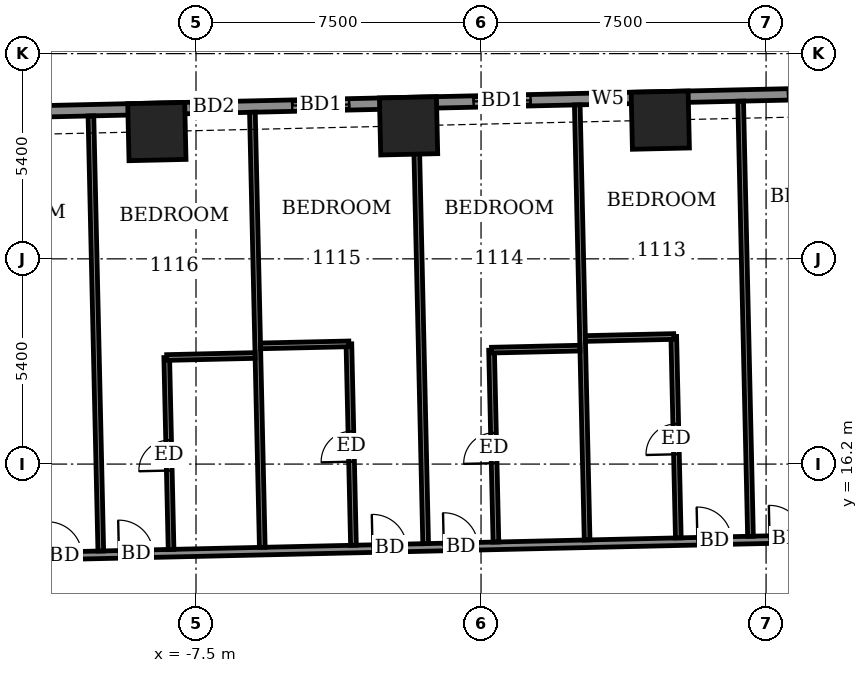
"""IFC4 building model, lengths in metres.
Left out: names, types, materials, properties, quantities, classifications, styles, units other than length and angle.
Written with IfcOpenShell. Run it as: python <this file> out.ifc"""

import sys

from ifc_helpers import new_model, si_unit, direction, frame, frame_2d, origin, origin_2d, place, context, subcontext, project, spatial, rectangle, extrude, element, fill, save


model = new_model("IFC4")
c1 = context("Model", 3, precision=1e-05, world=origin(), true_north=direction((0.0, 1.0)))
c2 = subcontext(c1, "Body", "Model", "MODEL_VIEW")
j1 = project(units=[si_unit("LENGTHUNIT", "METRE"), si_unit("PLANEANGLEUNIT", "RADIAN")], contexts=[c1])
p1 = place(None, origin())
s1 = spatial("IfcSite", under=j1, at=p1, CompositionType="ELEMENT")
p2 = place(p1, origin())
s2 = spatial("IfcBuilding", under=s1, at=p2, CompositionType="ELEMENT")
p3 = place(p2, frame((0.0, 0.0, 48.5)))
s3 = spatial("IfcBuildingStorey", under=s2, at=p3, CompositionType="ELEMENT", Elevation=48.5)
for number, where, z_axis, x_axis in (
    (1, (4.716, 25.25, -0.55), (0.0, 0.0, 1.0), (-1.0, -0.023, 0.0)),
    (2, (-1.907, 25.1, -0.55), (0.0, 0.0, 1.0), (-1.0, -0.023, 0.0)),
    (3, (-8.53, 24.949, -0.55), (0.0, 0.0, 1.0), (-1.0, -0.023, 0.0)),
):
    element("IfcColumn", number, at=place(p3, frame(where, z_axis=z_axis, x_axis=x_axis)), inside=s3, PredefinedType="COLUMN", context=c2, shape_type="SweptSolid", body=[
        extrude(rectangle(XDim=1.5, YDim=1.5, at=origin_2d()), origin(), (0.0, 0.0, 1.0), 3.6),
    ])
p4 = place(p3, frame((24.423, 26.298, 0.0), z_axis=(0.0, 0.0, 1.0), x_axis=(-0.999742433108, -0.022695097355, 0.0)))
e4 = element("IfcWall", 4, at=p4, inside=s3, PredefinedType="SOLIDWALL", context=c2, shape_type="SweptSolid", body=[
    extrude(rectangle(XDim=52.701, YDim=0.3, at=frame_2d((26.35, 0.0))), origin(), (0.0, 0.0, 1.0), 3.05),
])
p5 = place(p4, frame((2.009, 0.0, 0.0)))
e5 = element("IfcOpeningElement", 5, at=p5, cuts=e4, PredefinedType="OPENING", context=c2, shape_type="SweptSolid", body=[
    extrude(rectangle(XDim=1.5, YDim=2.4, at=frame_2d((0.75, 1.2))), frame((0.0, 0.16, 0.0), z_axis=(0.0, -1.0, 0.0), x_axis=(1.0, 0.0, 0.0)), (0.0, 0.0, 1.0), 0.32),
])
p6 = place(p4, frame((7.337, 0.0, 0.0)))
e6 = element("IfcOpeningElement", 6, at=p6, cuts=e4, PredefinedType="OPENING", context=c2, shape_type="SweptSolid", body=[
    extrude(rectangle(XDim=1.2, YDim=2.4, at=frame_2d((0.6, 1.2))), frame((0.0, 0.16, 0.0), z_axis=(0.0, -1.0, 0.0), x_axis=(1.0, 0.0, 0.0)), (0.0, 0.0, 1.0), 0.32),
])
p7 = place(p4, frame((10.0, 0.0, 0.0)))
e7 = element("IfcOpeningElement", 7, at=p7, cuts=e4, PredefinedType="OPENING", context=c2, shape_type="SweptSolid", body=[
    extrude(rectangle(XDim=1.5, YDim=2.4, at=frame_2d((0.75, 1.2))), frame((0.0, 0.16, 0.0), z_axis=(0.0, -1.0, 0.0), x_axis=(1.0, 0.0, 0.0)), (0.0, 0.0, 1.0), 0.32),
])
p8 = place(p4, frame((14.85, 0.0, 0.0)))
e8 = element("IfcOpeningElement", 8, at=p8, cuts=e4, PredefinedType="OPENING", context=c2, shape_type="SweptSolid", body=[
    extrude(rectangle(XDim=1.5, YDim=2.4, at=frame_2d((0.75, 1.2))), frame((0.0, 0.16, 0.0), z_axis=(0.0, -1.0, 0.0), x_axis=(1.0, 0.0, 0.0)), (0.0, 0.0, 1.0), 0.32),
])
p9 = place(p4, frame((20.638, 0.0, 0.9)))
e9 = element("IfcOpeningElement", 9, at=p9, cuts=e4, PredefinedType="OPENING", context=c2, shape_type="SweptSolid", body=[
    extrude(rectangle(XDim=0.9, YDim=1.5, at=frame_2d((0.45, 0.75))), frame((0.0, 0.16, 0.0), z_axis=(0.0, -1.0, 0.0), x_axis=(1.0, 0.0, 0.0)), (0.0, 0.0, 1.0), 0.32),
])
p10 = place(p4, frame((23.125, 0.0, 0.0)))
e10 = element("IfcOpeningElement", 10, at=p10, cuts=e4, PredefinedType="OPENING", context=c2, shape_type="SweptSolid", body=[
    extrude(rectangle(XDim=1.5, YDim=2.4, at=frame_2d((0.75, 1.2))), frame((0.0, 0.16, 0.0), z_axis=(0.0, -1.0, 0.0), x_axis=(1.0, 0.0, 0.0)), (0.0, 0.0, 1.0), 0.32),
])
p11 = place(p4, frame((27.9, 0.0, 0.0)))
e11 = element("IfcOpeningElement", 11, at=p11, cuts=e4, PredefinedType="OPENING", context=c2, shape_type="SweptSolid", body=[
    extrude(rectangle(XDim=1.5, YDim=2.4, at=frame_2d((0.75, 1.2))), frame((0.0, 0.16, 0.0), z_axis=(0.0, -1.0, 0.0), x_axis=(1.0, 0.0, 0.0)), (0.0, 0.0, 1.0), 0.32),
])
p12 = place(p4, frame((30.862, 0.0, 0.0)))
e12 = element("IfcOpeningElement", 12, at=p12, cuts=e4, PredefinedType="OPENING", context=c2, shape_type="SweptSolid", body=[
    extrude(rectangle(XDim=1.2, YDim=2.4, at=frame_2d((0.6, 1.2))), frame((0.0, 0.16, 0.0), z_axis=(0.0, -1.0, 0.0), x_axis=(1.0, 0.0, 0.0)), (0.0, 0.0, 1.0), 0.32),
])
p13 = place(p4, frame((36.1, 0.0, 0.0)))
e13 = element("IfcOpeningElement", 13, at=p13, cuts=e4, PredefinedType="OPENING", context=c2, shape_type="SweptSolid", body=[
    extrude(rectangle(XDim=1.5, YDim=2.4, at=frame_2d((0.75, 1.2))), frame((0.0, 0.16, 0.0), z_axis=(0.0, -1.0, 0.0), x_axis=(1.0, 0.0, 0.0)), (0.0, 0.0, 1.0), 0.32),
])
p14 = place(p4, frame((40.975, 0.0, 0.0)))
e14 = element("IfcOpeningElement", 14, at=p14, cuts=e4, PredefinedType="OPENING", context=c2, shape_type="SweptSolid", body=[
    extrude(rectangle(XDim=1.5, YDim=2.4, at=frame_2d((0.75, 1.2))), frame((0.0, 0.16, 0.0), z_axis=(0.0, -1.0, 0.0), x_axis=(1.0, 0.0, 0.0)), (0.0, 0.0, 1.0), 0.32),
])
p15 = place(p4, frame((43.788, 0.0, 0.0)))
e15 = element("IfcOpeningElement", 15, at=p15, cuts=e4, PredefinedType="OPENING", context=c2, shape_type="SweptSolid", body=[
    extrude(rectangle(XDim=1.5, YDim=2.4, at=frame_2d((0.75, 1.2))), frame((0.0, 0.16, 0.0), z_axis=(0.0, -1.0, 0.0), x_axis=(1.0, 0.0, 0.0)), (0.0, 0.0, 1.0), 0.32),
])
p16 = place(p4, frame((48.464, 0.0, 0.9)))
e16 = element("IfcOpeningElement", 16, at=p16, cuts=e4, PredefinedType="OPENING", context=c2, shape_type="SweptSolid", body=[
    extrude(rectangle(XDim=2.4, YDim=1.5, at=frame_2d((1.2, 0.75))), frame((0.0, 0.16, 0.0), z_axis=(0.0, -1.0, 0.0), x_axis=(1.0, 0.0, 0.0)), (0.0, 0.0, 1.0), 0.32),
])
p17 = place(p3, frame((-12.25, 26.915, 0.0), z_axis=(0.0, 0.0, 1.0), x_axis=(0.999743094499, 0.022665943652, 0.0)))
e17 = element("IfcWall", 17, at=p17, inside=s3, PredefinedType="USERDEFINED", context=c2, shape_type="SweptSolid", body=[
    extrude(rectangle(XDim=6.0, YDim=0.55, at=frame_2d((3.0, 0.0))), origin(), (0.0, 0.0, 1.0), 0.8),
])
p18 = place(p3, frame((-31.347, 13.329, 0.0), z_axis=(0.0, 0.0, 1.0), x_axis=(0.999742613079, 0.022687168058, 0.0)))
e18 = element("IfcWall", 18, at=p18, inside=s3, PredefinedType="PARTITIONING", context=c2, shape_type="SweptSolid", body=[
    extrude(rectangle(XDim=58.799, YDim=0.2, at=frame_2d((29.399, 0.0))), origin(), (0.0, 0.0, 1.0), 3.05),
])
p19 = place(p18, frame((56.675, 0.0, 0.0)))
e19 = element("IfcOpeningElement", 19, at=p19, cuts=e18, PredefinedType="OPENING", context=c2, shape_type="SweptSolid", body=[
    extrude(rectangle(XDim=1.0, YDim=2.1, at=frame_2d((0.5, 1.05))), frame((0.0, 0.11, 0.0), z_axis=(0.0, -1.0, 0.0), x_axis=(1.0, 0.0, 0.0)), (0.0, 0.0, 1.0), 0.22),
])
p20 = place(p18, frame((52.4, 0.0, 0.0)))
e20 = element("IfcOpeningElement", 20, at=p20, cuts=e18, PredefinedType="OPENING", context=c2, shape_type="SweptSolid", body=[
    extrude(rectangle(XDim=0.9, YDim=2.1, at=frame_2d((0.45, 1.05))), frame((0.0, 0.11, 0.0), z_axis=(0.0, -1.0, 0.0), x_axis=(1.0, 0.0, 0.0)), (0.0, 0.0, 1.0), 0.22),
])
p21 = place(p18, frame((47.7, 0.0, 0.0)))
e21 = element("IfcOpeningElement", 21, at=p21, cuts=e18, PredefinedType="OPENING", context=c2, shape_type="SweptSolid", body=[
    extrude(rectangle(XDim=0.9, YDim=2.1, at=frame_2d((0.45, 1.05))), frame((0.0, 0.11, 0.0), z_axis=(0.0, -1.0, 0.0), x_axis=(1.0, 0.0, 0.0)), (0.0, 0.0, 1.0), 0.22),
])
p22 = place(p18, frame((45.7, 0.0, 0.0)))
e22 = element("IfcOpeningElement", 22, at=p22, cuts=e18, PredefinedType="OPENING", context=c2, shape_type="SweptSolid", body=[
    extrude(rectangle(XDim=0.9, YDim=2.1, at=frame_2d((0.45, 1.05))), frame((0.0, 0.11, 0.0), z_axis=(0.0, -1.0, 0.0), x_axis=(1.0, 0.0, 0.0)), (0.0, 0.0, 1.0), 0.22),
])
p23 = place(p18, frame((38.95, 0.0, 0.0)))
e23 = element("IfcOpeningElement", 23, at=p23, cuts=e18, PredefinedType="OPENING", context=c2, shape_type="SweptSolid", body=[
    extrude(rectangle(XDim=0.9, YDim=2.1, at=frame_2d((0.45, 1.05))), frame((0.0, 0.11, 0.0), z_axis=(0.0, -1.0, 0.0), x_axis=(1.0, 0.0, 0.0)), (0.0, 0.0, 1.0), 0.22),
])
p24 = place(p18, frame((37.05, 0.0, 0.0)))
e24 = element("IfcOpeningElement", 24, at=p24, cuts=e18, PredefinedType="OPENING", context=c2, shape_type="SweptSolid", body=[
    extrude(rectangle(XDim=0.9, YDim=2.1, at=frame_2d((0.45, 1.05))), frame((0.0, 0.11, 0.0), z_axis=(0.0, -1.0, 0.0), x_axis=(1.0, 0.0, 0.0)), (0.0, 0.0, 1.0), 0.22),
])
p25 = place(p18, frame((30.375, 0.0, 0.0)))
e25 = element("IfcOpeningElement", 25, at=p25, cuts=e18, PredefinedType="OPENING", context=c2, shape_type="SweptSolid", body=[
    extrude(rectangle(XDim=0.9, YDim=2.1, at=frame_2d((0.45, 1.05))), frame((0.0, 0.11, 0.0), z_axis=(0.0, -1.0, 0.0), x_axis=(1.0, 0.0, 0.0)), (0.0, 0.0, 1.0), 0.22),
])
p26 = place(p18, frame((28.5, 0.0, 0.0)))
e26 = element("IfcOpeningElement", 26, at=p26, cuts=e18, PredefinedType="OPENING", context=c2, shape_type="SweptSolid", body=[
    extrude(rectangle(XDim=0.9, YDim=2.1, at=frame_2d((0.45, 1.05))), frame((0.0, 0.11, 0.0), z_axis=(0.0, -1.0, 0.0), x_axis=(1.0, 0.0, 0.0)), (0.0, 0.0, 1.0), 0.22),
])
p27 = place(p18, frame((21.825, 0.0, 0.0)))
e27 = element("IfcOpeningElement", 27, at=p27, cuts=e18, PredefinedType="OPENING", context=c2, shape_type="SweptSolid", body=[
    extrude(rectangle(XDim=0.9, YDim=2.1, at=frame_2d((0.45, 1.05))), frame((0.0, 0.11, 0.0), z_axis=(0.0, -1.0, 0.0), x_axis=(1.0, 0.0, 0.0)), (0.0, 0.0, 1.0), 0.22),
])
p28 = place(p18, frame((19.95, 0.0, 0.0)))
e28 = element("IfcOpeningElement", 28, at=p28, cuts=e18, PredefinedType="OPENING", context=c2, shape_type="SweptSolid", body=[
    extrude(rectangle(XDim=0.9, YDim=2.1, at=frame_2d((0.45, 1.05))), frame((0.0, 0.11, 0.0), z_axis=(0.0, -1.0, 0.0), x_axis=(1.0, 0.0, 0.0)), (0.0, 0.0, 1.0), 0.22),
])
p29 = place(p18, frame((13.225, 0.0, 0.0)))
e29 = element("IfcOpeningElement", 29, at=p29, cuts=e18, PredefinedType="OPENING", context=c2, shape_type="SweptSolid", body=[
    extrude(rectangle(XDim=0.9, YDim=2.1, at=frame_2d((0.45, 1.05))), frame((0.0, 0.11, 0.0), z_axis=(0.0, -1.0, 0.0), x_axis=(1.0, 0.0, 0.0)), (0.0, 0.0, 1.0), 0.22),
])
p30 = place(p18, frame((11.25, 0.0, 0.0)))
e30 = element("IfcOpeningElement", 30, at=p30, cuts=e18, PredefinedType="OPENING", context=c2, shape_type="SweptSolid", body=[
    extrude(rectangle(XDim=0.9, YDim=2.1, at=frame_2d((0.45, 1.05))), frame((0.0, 0.11, 0.0), z_axis=(0.0, -1.0, 0.0), x_axis=(1.0, 0.0, 0.0)), (0.0, 0.0, 1.0), 0.22),
])
p31 = place(p18, frame((1.75, 0.0, 0.0)))
e31 = element("IfcOpeningElement", 31, at=p31, cuts=e18, PredefinedType="OPENING", context=c2, shape_type="SweptSolid", body=[
    extrude(rectangle(XDim=1.0, YDim=2.1, at=frame_2d((0.5, 1.05))), frame((0.0, 0.11, 0.0), z_axis=(0.0, -1.0, 0.0), x_axis=(1.0, 0.0, 0.0)), (0.0, 0.0, 1.0), 0.22),
])
p32 = place(p18, frame((6.65, 0.0, 0.0)))
e32 = element("IfcOpeningElement", 32, at=p32, cuts=e18, PredefinedType="OPENING", context=c2, shape_type="SweptSolid", body=[
    extrude(rectangle(XDim=0.9, YDim=2.1, at=frame_2d((0.45, 1.05))), frame((0.0, 0.11, 0.0), z_axis=(0.0, -1.0, 0.0), x_axis=(1.0, 0.0, 0.0)), (0.0, 0.0, 1.0), 0.22),
])
p33 = place(p3, frame((-10.005, 13.913, 0.0), z_axis=(0.0, 0.0, 1.0), x_axis=(-0.022706391805, 0.999742176649, 0.0)))
e33 = element("IfcWall", 33, at=p33, inside=s3, PredefinedType="PARTITIONING", context=c2, shape_type="SweptSolid", body=[
    extrude(rectangle(XDim=11.451, YDim=0.15, at=frame_2d((5.726, 0.0))), origin(), (0.0, 0.0, 1.0), 2.55),
])
p34 = place(p3, frame((-8.156, 13.955, 0.0), z_axis=(0.0, 0.0, 1.0), x_axis=(-0.022576449265, 0.999745119487, 0.0)))
e34 = element("IfcWall", 34, at=p34, inside=s3, PredefinedType="PARTITIONING", context=c2, shape_type="SweptSolid", body=[
    extrude(rectangle(XDim=5.05, YDim=0.15, at=frame_2d((2.525, 0.0))), origin(), (0.0, 0.0, 1.0), 3.05),
])
p35 = place(p34, frame((2.075, 0.0, 0.0)))
e35 = element("IfcOpeningElement", 35, at=p35, cuts=e34, PredefinedType="OPENING", context=c2, shape_type="SweptSolid", body=[
    extrude(rectangle(XDim=0.8, YDim=2.1, at=frame_2d((0.4, 1.05))), frame((0.0, 0.085, 0.0), z_axis=(0.0, -1.0, 0.0), x_axis=(1.0, 0.0, 0.0)), (0.0, 0.0, 1.0), 0.17),
])
p36 = place(p3, frame((-5.756, 14.01, 0.0), z_axis=(0.0, 0.0, 1.0), x_axis=(-0.022708327922, 0.999742132674, 0.0)))
e36 = element("IfcWall", 36, at=p36, inside=s3, PredefinedType="PARTITIONING", context=c2, shape_type="SweptSolid", body=[
    extrude(rectangle(XDim=11.45, YDim=0.15, at=frame_2d((5.725, 0.0))), origin(), (0.0, 0.0, 1.0), 2.55),
])
p37 = place(p3, frame((-3.357, 14.064, 0.0), z_axis=(0.0, 0.0, 1.0), x_axis=(-0.022661766832, 0.999743189186, 0.0)))
e37 = element("IfcWall", 37, at=p37, inside=s3, PredefinedType="PARTITIONING", context=c2, shape_type="SweptSolid", body=[
    extrude(rectangle(XDim=5.301, YDim=0.15, at=frame_2d((2.65, 0.0))), origin(), (0.0, 0.0, 1.0), 3.05),
])
p38 = place(p37, frame((2.2, 0.0, 0.0)))
e38 = element("IfcOpeningElement", 38, at=p38, cuts=e37, PredefinedType="OPENING", context=c2, shape_type="SweptSolid", body=[
    extrude(rectangle(XDim=0.8, YDim=2.1, at=frame_2d((0.4, 1.05))), frame((0.0, 0.085, 0.0), z_axis=(0.0, -1.0, 0.0), x_axis=(1.0, 0.0, 0.0)), (0.0, 0.0, 1.0), 0.17),
])
p39 = place(p3, frame((-1.457, 14.107, 0.0), z_axis=(0.0, 0.0, 1.0), x_axis=(-0.022706391805, 0.999742176649, 0.0)))
e39 = element("IfcWall", 39, at=p39, inside=s3, PredefinedType="PARTITIONING", context=c2, shape_type="SweptSolid", body=[
    extrude(rectangle(XDim=11.451, YDim=0.15, at=frame_2d((5.726, 0.0))), origin(), (0.0, 0.0, 1.0), 3.05),
])
p40 = place(p3, frame((0.392, 14.149, 0.0), z_axis=(0.0, 0.0, 1.0), x_axis=(-0.022768623305, 0.999740761294, 0.0)))
e40 = element("IfcWall", 40, at=p40, inside=s3, PredefinedType="PARTITIONING", context=c2, shape_type="SweptSolid", body=[
    extrude(rectangle(XDim=5.05, YDim=0.15, at=frame_2d((2.525, 0.0))), origin(), (0.0, 0.0, 1.0), 3.05),
])
p41 = place(p40, frame((2.075, 0.0, 0.0)))
e41 = element("IfcOpeningElement", 41, at=p41, cuts=e40, PredefinedType="OPENING", context=c2, shape_type="SweptSolid", body=[
    extrude(rectangle(XDim=0.8, YDim=2.1, at=frame_2d((0.4, 1.05))), frame((0.0, 0.085, 0.0), z_axis=(0.0, -1.0, 0.0), x_axis=(1.0, 0.0, 0.0)), (0.0, 0.0, 1.0), 0.17),
])
p42 = place(p3, frame((2.791, 14.204, 0.0), z_axis=(0.0, 0.0, 1.0), x_axis=(-0.022623564427, 0.999744054412, 0.0)))
e42 = element("IfcWall", 42, at=p42, inside=s3, PredefinedType="PARTITIONING", context=c2, shape_type="SweptSolid", body=[
    extrude(rectangle(XDim=11.45, YDim=0.15, at=frame_2d((5.725, 0.0))), origin(), (0.0, 0.0, 1.0), 2.55),
])
p43 = place(p3, frame((5.191, 14.258, 0.0), z_axis=(0.0, 0.0, 1.0), x_axis=(-0.022616771387, 0.999744208111, 0.0)))
e43 = element("IfcWall", 43, at=p43, inside=s3, PredefinedType="PARTITIONING", context=c2, shape_type="SweptSolid", body=[
    extrude(rectangle(XDim=5.3, YDim=0.15, at=frame_2d((2.65, 0.0))), origin(), (0.0, 0.0, 1.0), 3.05),
])
p44 = place(p43, frame((2.2, 0.0, 0.0)))
e44 = element("IfcOpeningElement", 44, at=p44, cuts=e43, PredefinedType="OPENING", context=c2, shape_type="SweptSolid", body=[
    extrude(rectangle(XDim=0.8, YDim=2.1, at=frame_2d((0.4, 1.05))), frame((0.0, 0.085, 0.0), z_axis=(0.0, -1.0, 0.0), x_axis=(1.0, 0.0, 0.0)), (0.0, 0.0, 1.0), 0.17),
])
p45 = place(p3, frame((7.09, 14.301, 0.0), z_axis=(0.0, 0.0, 1.0), x_axis=(-0.022621153305, 0.999744108971, 0.0)))
e45 = element("IfcWall", 45, at=p45, inside=s3, PredefinedType="PARTITIONING", context=c2, shape_type="SweptSolid", body=[
    extrude(rectangle(XDim=11.451, YDim=0.15, at=frame_2d((5.726, 0.0))), origin(), (0.0, 0.0, 1.0), 2.55),
])
p46 = place(p3, frame((-8.27, 19.004, 0.0), z_axis=(0.0, 0.0, 1.0), x_axis=(0.999740260747, 0.02279059109, 0.0)))
e46 = element("IfcWall", 46, at=p46, inside=s3, PredefinedType="PARTITIONING", context=c2, shape_type="SweptSolid", body=[
    extrude(rectangle(XDim=2.324, YDim=0.15, at=frame_2d((1.162, 0.0))), origin(), (0.0, 0.0, 1.0), 3.05),
])
for number, where, z_axis, x_axis in (
    (47, (0.277, 19.198, 0.0), (0.0, 0.0, 1.0), (1.0, 0.023, 0.0)),
    (48, (-5.802, 19.31, 0.0), (0.0, 0.0, 1.0), (1.0, 0.023, 0.0)),
    (49, (2.746, 19.504, 0.0), (0.0, 0.0, 1.0), (1.0, 0.023, 0.0)),
):
    element("IfcWall", number, at=place(p3, frame(where, z_axis=z_axis, x_axis=x_axis)), inside=s3, PredefinedType="PARTITIONING", context=c2, shape_type="SweptSolid", body=[
        extrude(rectangle(XDim=2.325, YDim=0.15, at=frame_2d((1.163, 0.0))), origin(), (0.0, 0.0, 1.0), 3.05),
    ])
p47 = place(p8, origin())
e50 = element("IfcDoor", 50, at=p47, inside=s3, OperationType="SLIDING_TO_LEFT", PredefinedType="DOOR", context=c2, shape_type="SweptSolid", body=[
    extrude(rectangle(XDim=1.5, YDim=2.4, at=frame_2d((0.75, 1.2))), frame((0.0, 0.025, 0.0), z_axis=(0.0, -1.0, 0.0), x_axis=(1.0, 0.0, 0.0)), (0.0, 0.0, 1.0), 0.05),
])
fill(e8, e50)
p48 = place(p9, origin())
e51 = element("IfcWindow", 51, at=p48, inside=s3, PartitioningType="SINGLE_PANEL", PredefinedType="WINDOW", context=c2, shape_type="SweptSolid", body=[
    extrude(rectangle(XDim=0.9, YDim=1.5, at=frame_2d((0.45, 0.75))), frame((0.0, 0.03, 0.0), z_axis=(0.0, -1.0, 0.0), x_axis=(1.0, 0.0, 0.0)), (0.0, 0.0, 1.0), 0.06),
])
fill(e9, e51)
p49 = place(p10, origin())
e52 = element("IfcDoor", 52, at=p49, inside=s3, OperationType="SLIDING_TO_LEFT", PredefinedType="DOOR", context=c2, shape_type="SweptSolid", body=[
    extrude(rectangle(XDim=1.5, YDim=2.4, at=frame_2d((0.75, 1.2))), frame((0.0, 0.025, 0.0), z_axis=(0.0, -1.0, 0.0), x_axis=(1.0, 0.0, 0.0)), (0.0, 0.0, 1.0), 0.05),
])
fill(e10, e52)
p50 = place(p11, origin())
e53 = element("IfcDoor", 53, at=p50, inside=s3, OperationType="SLIDING_TO_LEFT", PredefinedType="DOOR", context=c2, shape_type="SweptSolid", body=[
    extrude(rectangle(XDim=1.5, YDim=2.4, at=frame_2d((0.75, 1.2))), frame((0.0, 0.025, 0.0), z_axis=(0.0, -1.0, 0.0), x_axis=(1.0, 0.0, 0.0)), (0.0, 0.0, 1.0), 0.05),
])
fill(e11, e53)
p51 = place(p12, origin())
e54 = element("IfcDoor", 54, at=p51, inside=s3, OperationType="SLIDING_TO_LEFT", PredefinedType="DOOR", context=c2, shape_type="SweptSolid", body=[
    extrude(rectangle(XDim=1.2, YDim=2.4, at=frame_2d((0.6, 1.2))), frame((0.0, 0.025, 0.0), z_axis=(0.0, -1.0, 0.0), x_axis=(1.0, 0.0, 0.0)), (0.0, 0.0, 1.0), 0.05),
])
fill(e12, e54)
p52 = place(p23, origin())
e55 = element("IfcDoor", 55, at=p52, inside=s3, OperationType="SINGLE_SWING_RIGHT", PredefinedType="DOOR", context=c2, shape_type="SweptSolid", body=[
    extrude(rectangle(XDim=0.9, YDim=2.1, at=frame_2d((0.45, 1.05))), frame((0.0, 0.025, 0.0), z_axis=(0.0, -1.0, 0.0), x_axis=(1.0, 0.0, 0.0)), (0.0, 0.0, 1.0), 0.05),
])
fill(e23, e55)
p53 = place(p24, origin())
e56 = element("IfcDoor", 56, at=p53, inside=s3, OperationType="SINGLE_SWING_LEFT", PredefinedType="DOOR", context=c2, shape_type="SweptSolid", body=[
    extrude(rectangle(XDim=0.9, YDim=2.1, at=frame_2d((0.45, 1.05))), frame((0.0, 0.025, 0.0), z_axis=(0.0, -1.0, 0.0), x_axis=(1.0, 0.0, 0.0)), (0.0, 0.0, 1.0), 0.05),
])
fill(e24, e56)
p54 = place(p44, origin())
e57 = element("IfcDoor", 57, at=p54, inside=s3, OperationType="SINGLE_SWING_LEFT", PredefinedType="DOOR", context=c2, shape_type="SweptSolid", body=[
    extrude(rectangle(XDim=0.8, YDim=2.1, at=frame_2d((0.4, 1.05))), frame((0.0, 0.025, 0.0), z_axis=(0.0, -1.0, 0.0), x_axis=(1.0, 0.0, 0.0)), (0.0, 0.0, 1.0), 0.05),
])
fill(e44, e57)
p55 = place(p25, origin())
e58 = element("IfcDoor", 58, at=p55, inside=s3, OperationType="SINGLE_SWING_RIGHT", PredefinedType="DOOR", context=c2, shape_type="SweptSolid", body=[
    extrude(rectangle(XDim=0.9, YDim=2.1, at=frame_2d((0.45, 1.05))), frame((0.0, 0.025, 0.0), z_axis=(0.0, -1.0, 0.0), x_axis=(1.0, 0.0, 0.0)), (0.0, 0.0, 1.0), 0.05),
])
fill(e25, e58)
p56 = place(p41, origin())
e59 = element("IfcDoor", 59, at=p56, inside=s3, OperationType="SINGLE_SWING_RIGHT", PredefinedType="DOOR", context=c2, shape_type="SweptSolid", body=[
    extrude(rectangle(XDim=0.8, YDim=2.1, at=frame_2d((0.4, 1.05))), frame((0.0, 0.025, 0.0), z_axis=(0.0, -1.0, 0.0), x_axis=(1.0, 0.0, 0.0)), (0.0, 0.0, 1.0), 0.05),
])
fill(e41, e59)
p57 = place(p26, origin())
e60 = element("IfcDoor", 60, at=p57, inside=s3, OperationType="SINGLE_SWING_LEFT", PredefinedType="DOOR", context=c2, shape_type="SweptSolid", body=[
    extrude(rectangle(XDim=0.9, YDim=2.1, at=frame_2d((0.45, 1.05))), frame((0.0, 0.025, 0.0), z_axis=(0.0, -1.0, 0.0), x_axis=(1.0, 0.0, 0.0)), (0.0, 0.0, 1.0), 0.05),
])
fill(e26, e60)
p58 = place(p38, origin())
e61 = element("IfcDoor", 61, at=p58, inside=s3, OperationType="SINGLE_SWING_LEFT", PredefinedType="DOOR", context=c2, shape_type="SweptSolid", body=[
    extrude(rectangle(XDim=0.8, YDim=2.1, at=frame_2d((0.4, 1.05))), frame((0.0, 0.025, 0.0), z_axis=(0.0, -1.0, 0.0), x_axis=(1.0, 0.0, 0.0)), (0.0, 0.0, 1.0), 0.05),
])
fill(e38, e61)
p59 = place(p27, origin())
e62 = element("IfcDoor", 62, at=p59, inside=s3, OperationType="SINGLE_SWING_RIGHT", PredefinedType="DOOR", context=c2, shape_type="SweptSolid", body=[
    extrude(rectangle(XDim=0.9, YDim=2.1, at=frame_2d((0.45, 1.05))), frame((0.0, 0.025, 0.0), z_axis=(0.0, -1.0, 0.0), x_axis=(1.0, 0.0, 0.0)), (0.0, 0.0, 1.0), 0.05),
])
fill(e27, e62)
p60 = place(p35, origin())
e63 = element("IfcDoor", 63, at=p60, inside=s3, OperationType="SINGLE_SWING_RIGHT", PredefinedType="DOOR", context=c2, shape_type="SweptSolid", body=[
    extrude(rectangle(XDim=0.8, YDim=2.1, at=frame_2d((0.4, 1.05))), frame((0.0, 0.025, 0.0), z_axis=(0.0, -1.0, 0.0), x_axis=(1.0, 0.0, 0.0)), (0.0, 0.0, 1.0), 0.05),
])
fill(e35, e63)
p61 = place(p28, origin())
e64 = element("IfcDoor", 64, at=p61, inside=s3, OperationType="SINGLE_SWING_LEFT", PredefinedType="DOOR", context=c2, shape_type="SweptSolid", body=[
    extrude(rectangle(XDim=0.9, YDim=2.1, at=frame_2d((0.45, 1.05))), frame((0.0, 0.025, 0.0), z_axis=(0.0, -1.0, 0.0), x_axis=(1.0, 0.0, 0.0)), (0.0, 0.0, 1.0), 0.05),
])
fill(e28, e64)
save(model, sys.argv[1])
